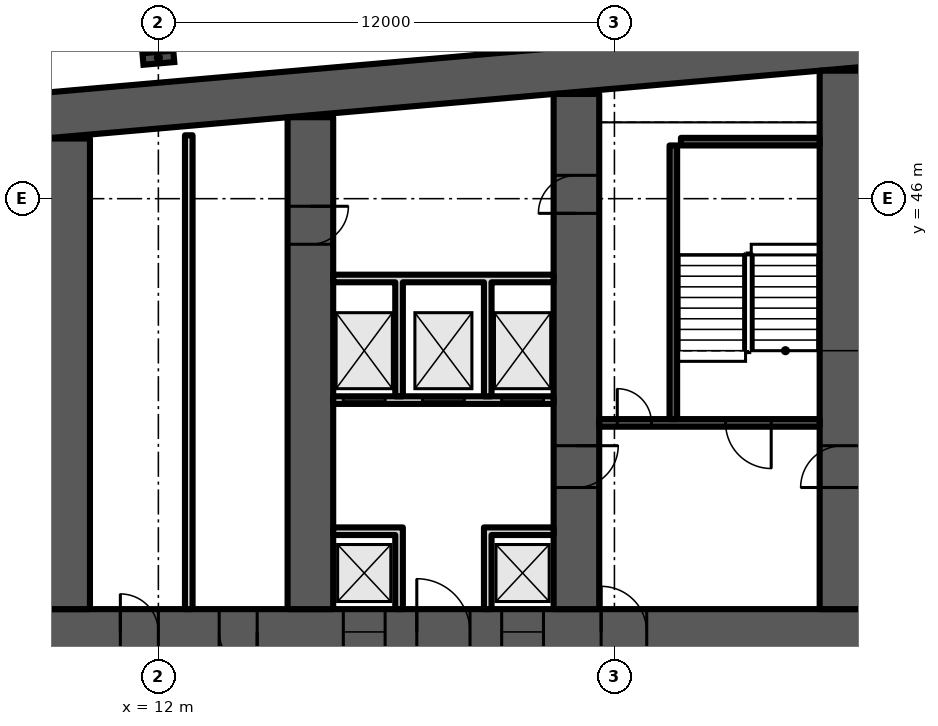
"""IFC4 building model, lengths in metres.
Left out: names, types, materials, properties, quantities, classifications, styles, units other than length and angle.
Written with IfcOpenShell. Run it as: python <this file> out.ifc"""

import sys

from ifc_helpers import new_model, si_unit, direction, frame, frame_2d, origin, origin_2d, place, context, subcontext, project, spatial, polyline, rectangle, i_section, outline, extrude, element, fill, save


model = new_model("IFC4")
c1 = context("Model", 3, precision=1e-05, world=origin(), true_north=direction((0.0, 1.0)))
c2 = subcontext(c1, "Body", "Model", "MODEL_VIEW")
j1 = project(units=[si_unit("LENGTHUNIT", "METRE"), si_unit("PLANEANGLEUNIT", "RADIAN")], contexts=[c1])
p1 = place(None, origin())
s1 = spatial("IfcSite", under=j1, at=p1, CompositionType="ELEMENT")
p2 = place(p1, origin())
s2 = spatial("IfcBuilding", under=s1, at=p2, CompositionType="ELEMENT")
p3 = place(p2, frame((0.0, 0.0, 73.9)))
s3 = spatial("IfcBuildingStorey", under=s2, at=p3, CompositionType="ELEMENT", Elevation=73.9)
p4 = place(p3, origin())
e1 = element("IfcWall", 1, at=p4, inside=s3, PredefinedType="SHEAR", context=c2, shape_type="SweptSolid", body=[
    extrude(outline(polyline([(9.0, 47.583), (37.0, 50.032), (65.0, 47.583), (65.0, 48.787), (37.0, 51.237), (9.0, 48.787), (9.0, 47.583)])), origin(), (0.0, 0.0, 1.0), 3.6),
])
p5 = place(p3, frame((9.0, 34.6, 0.0), z_axis=(0.0, 0.0, 1.0), x_axis=(1.0, 0.0, 0.0)))
e2 = element("IfcWall", 2, at=p5, inside=s3, PredefinedType="SHEAR", context=c2, shape_type="SweptSolid", body=[
    extrude(rectangle(XDim=56.0, YDim=1.2, at=frame_2d((28.0, 0.0))), origin(), (0.0, 0.0, 1.0), 3.6),
])
p6 = place(p5, frame((2.0, 0.0, 0.0)))
e3 = element("IfcOpeningElement", 3, at=p6, cuts=e2, PredefinedType="OPENING", context=c2, shape_type="SweptSolid", body=[
    extrude(rectangle(XDim=1.0, YDim=2.1, at=frame_2d((0.5, 1.05))), frame((0.0, 0.61, 0.0), z_axis=(0.0, -1.0, 0.0), x_axis=(1.0, 0.0, 0.0)), (0.0, 0.0, 1.0), 1.22),
])
p7 = place(p5, frame((4.6, 0.0, 0.0)))
e4 = element("IfcOpeningElement", 4, at=p7, cuts=e2, PredefinedType="OPENING", context=c2, shape_type="SweptSolid", body=[
    extrude(rectangle(XDim=1.0, YDim=2.1, at=frame_2d((0.5, 1.05))), frame((0.0, 0.61, 0.0), z_axis=(0.0, -1.0, 0.0), x_axis=(1.0, 0.0, 0.0)), (0.0, 0.0, 1.0), 1.22),
])
p8 = place(p5, frame((7.867, 0.0, 0.0)))
e5 = element("IfcOpeningElement", 5, at=p8, cuts=e2, PredefinedType="OPENING", context=c2, shape_type="SweptSolid", body=[
    extrude(rectangle(XDim=1.1, YDim=2.1, at=frame_2d((0.55, 1.05))), frame((0.0, 0.61, 0.0), z_axis=(0.0, -1.0, 0.0), x_axis=(1.0, 0.0, 0.0)), (0.0, 0.0, 1.0), 1.22),
])
p9 = place(p5, frame((12.033, 0.0, 0.0)))
e6 = element("IfcOpeningElement", 6, at=p9, cuts=e2, PredefinedType="OPENING", context=c2, shape_type="SweptSolid", body=[
    extrude(rectangle(XDim=1.1, YDim=2.1, at=frame_2d((0.55, 1.05))), frame((0.0, 0.61, 0.0), z_axis=(0.0, -1.0, 0.0), x_axis=(1.0, 0.0, 0.0)), (0.0, 0.0, 1.0), 1.22),
])
p10 = place(p5, frame((9.8, 0.0, 0.0)))
e7 = element("IfcOpeningElement", 7, at=p10, cuts=e2, PredefinedType="OPENING", context=c2, shape_type="SweptSolid", body=[
    extrude(rectangle(XDim=1.4, YDim=2.1, at=frame_2d((0.7, 1.05))), frame((0.0, 0.61, 0.0), z_axis=(0.0, -1.0, 0.0), x_axis=(1.0, 0.0, 0.0)), (0.0, 0.0, 1.0), 1.22),
])
p11 = place(p5, frame((14.65, 0.0, 0.0)))
e8 = element("IfcOpeningElement", 8, at=p11, cuts=e2, PredefinedType="OPENING", context=c2, shape_type="SweptSolid", body=[
    extrude(rectangle(XDim=1.2, YDim=2.1, at=frame_2d((0.6, 1.05))), frame((0.0, 0.61, 0.0), z_axis=(0.0, -1.0, 0.0), x_axis=(1.0, 0.0, 0.0)), (0.0, 0.0, 1.0), 1.22),
])
p12 = place(p5, frame((21.867, 0.0, 0.0)))
e9 = element("IfcOpeningElement", 9, at=p12, cuts=e2, PredefinedType="OPENING", context=c2, shape_type="SweptSolid", body=[
    extrude(rectangle(XDim=1.1, YDim=2.1, at=frame_2d((0.55, 1.05))), frame((0.0, 0.61, 0.0), z_axis=(0.0, -1.0, 0.0), x_axis=(1.0, 0.0, 0.0)), (0.0, 0.0, 1.0), 1.22),
])
p13 = place(p5, frame((26.033, 0.0, 0.0)))
e10 = element("IfcOpeningElement", 10, at=p13, cuts=e2, PredefinedType="OPENING", context=c2, shape_type="SweptSolid", body=[
    extrude(rectangle(XDim=1.1, YDim=2.1, at=frame_2d((0.55, 1.05))), frame((0.0, 0.61, 0.0), z_axis=(0.0, -1.0, 0.0), x_axis=(1.0, 0.0, 0.0)), (0.0, 0.0, 1.0), 1.22),
])
p14 = place(p5, frame((23.8, 0.0, 0.0)))
e11 = element("IfcOpeningElement", 11, at=p14, cuts=e2, PredefinedType="OPENING", context=c2, shape_type="SweptSolid", body=[
    extrude(rectangle(XDim=1.4, YDim=2.1, at=frame_2d((0.7, 1.05))), frame((0.0, 0.61, 0.0), z_axis=(0.0, -1.0, 0.0), x_axis=(1.0, 0.0, 0.0)), (0.0, 0.0, 1.0), 1.22),
])
p15 = place(p5, frame((28.867, 0.0, 0.0)))
e12 = element("IfcOpeningElement", 12, at=p15, cuts=e2, PredefinedType="OPENING", context=c2, shape_type="SweptSolid", body=[
    extrude(rectangle(XDim=1.1, YDim=2.1, at=frame_2d((0.55, 1.05))), frame((0.0, 0.61, 0.0), z_axis=(0.0, -1.0, 0.0), x_axis=(1.0, 0.0, 0.0)), (0.0, 0.0, 1.0), 1.22),
])
p16 = place(p5, frame((33.033, 0.0, 0.0)))
e13 = element("IfcOpeningElement", 13, at=p16, cuts=e2, PredefinedType="OPENING", context=c2, shape_type="SweptSolid", body=[
    extrude(rectangle(XDim=1.1, YDim=2.1, at=frame_2d((0.55, 1.05))), frame((0.0, 0.61, 0.0), z_axis=(0.0, -1.0, 0.0), x_axis=(1.0, 0.0, 0.0)), (0.0, 0.0, 1.0), 1.22),
])
p17 = place(p5, frame((40.15, 0.0, 0.0)))
e14 = element("IfcOpeningElement", 14, at=p17, cuts=e2, PredefinedType="OPENING", context=c2, shape_type="SweptSolid", body=[
    extrude(rectangle(XDim=1.2, YDim=2.1, at=frame_2d((0.6, 1.05))), frame((0.0, 0.61, 0.0), z_axis=(0.0, -1.0, 0.0), x_axis=(1.0, 0.0, 0.0)), (0.0, 0.0, 1.0), 1.22),
])
p18 = place(p5, frame((44.8, 0.0, 0.0)))
e15 = element("IfcOpeningElement", 15, at=p18, cuts=e2, PredefinedType="OPENING", context=c2, shape_type="SweptSolid", body=[
    extrude(rectangle(XDim=1.4, YDim=2.1, at=frame_2d((0.7, 1.05))), frame((0.0, 0.61, 0.0), z_axis=(0.0, -1.0, 0.0), x_axis=(1.0, 0.0, 0.0)), (0.0, 0.0, 1.0), 1.22),
])
p19 = place(p5, frame((49.867, 0.0, 0.0)))
e16 = element("IfcOpeningElement", 16, at=p19, cuts=e2, PredefinedType="OPENING", context=c2, shape_type="SweptSolid", body=[
    extrude(rectangle(XDim=1.1, YDim=2.1, at=frame_2d((0.55, 1.05))), frame((0.0, 0.61, 0.0), z_axis=(0.0, -1.0, 0.0), x_axis=(1.0, 0.0, 0.0)), (0.0, 0.0, 1.0), 1.22),
])
p20 = place(p5, frame((53.5, 0.0, 0.0)))
e17 = element("IfcOpeningElement", 17, at=p20, cuts=e2, PredefinedType="OPENING", context=c2, shape_type="SweptSolid", body=[
    extrude(rectangle(XDim=1.1, YDim=2.1, at=frame_2d((0.55, 1.05))), frame((0.0, 0.61, 0.0), z_axis=(0.0, -1.0, 0.0), x_axis=(1.0, 0.0, 0.0)), (0.0, 0.0, 1.0), 1.22),
])
p21 = place(p5, frame((51.567, 0.0, 0.0)))
e18 = element("IfcOpeningElement", 18, at=p21, cuts=e2, PredefinedType="OPENING", context=c2, shape_type="SweptSolid", body=[
    extrude(rectangle(XDim=1.4, YDim=2.1, at=frame_2d((0.7, 1.05))), frame((0.0, 0.61, 0.0), z_axis=(0.0, -1.0, 0.0), x_axis=(1.0, 0.0, 0.0)), (0.0, 0.0, 1.0), 1.22),
])
p22 = place(p3, frame((9.6, 35.2, 0.0), z_axis=(0.0, 0.0, 1.0), x_axis=(0.0, 1.0, 0.0)))
e19 = element("IfcWall", 19, at=p22, inside=s3, PredefinedType="SHEAR", context=c2, shape_type="SweptSolid", body=[
    extrude(rectangle(XDim=12.383, YDim=1.2, at=frame_2d((6.191, 0.0))), origin(), (0.0, 0.0, 1.0), 3.6),
])
p23 = place(p3, frame((16.0, 35.2, 0.0), z_axis=(0.0, 0.0, 1.0), x_axis=(0.0, 1.0, 0.0)))
e20 = element("IfcWall", 20, at=p23, inside=s3, PredefinedType="SHEAR", context=c2, shape_type="SweptSolid", body=[
    extrude(rectangle(XDim=12.943, YDim=1.2, at=frame_2d((6.471, 0.0))), origin(), (0.0, 0.0, 1.0), 3.6),
])
p24 = place(p23, frame((9.6, 0.0, 0.0)))
e21 = element("IfcOpeningElement", 21, at=p24, cuts=e20, PredefinedType="OPENING", context=c2, shape_type="SweptSolid", body=[
    extrude(rectangle(XDim=1.0, YDim=2.1, at=frame_2d((0.5, 1.05))), frame((0.0, 0.61, 0.0), z_axis=(0.0, -1.0, 0.0), x_axis=(1.0, 0.0, 0.0)), (0.0, 0.0, 1.0), 1.22),
])
p25 = place(p3, frame((23.0, 35.2, 0.0), z_axis=(0.0, 0.0, 1.0), x_axis=(0.0, 1.0, 0.0)))
e22 = element("IfcWall", 22, at=p25, inside=s3, PredefinedType="SHEAR", context=c2, shape_type="SweptSolid", body=[
    extrude(rectangle(XDim=13.555, YDim=1.2, at=frame_2d((6.778, 0.0))), origin(), (0.0, 0.0, 1.0), 3.6),
])
p26 = place(p25, frame((10.414, 0.0, 0.0)))
e23 = element("IfcOpeningElement", 23, at=p26, cuts=e22, PredefinedType="OPENING", context=c2, shape_type="SweptSolid", body=[
    extrude(rectangle(XDim=1.0, YDim=2.1, at=frame_2d((0.5, 1.05))), frame((0.0, 0.61, 0.0), z_axis=(0.0, -1.0, 0.0), x_axis=(1.0, 0.0, 0.0)), (0.0, 0.0, 1.0), 1.22),
])
p27 = place(p25, frame((3.2, 0.0, 0.0)))
e24 = element("IfcOpeningElement", 24, at=p27, cuts=e22, PredefinedType="OPENING", context=c2, shape_type="SweptSolid", body=[
    extrude(rectangle(XDim=1.1, YDim=2.1, at=frame_2d((0.55, 1.05))), frame((0.0, 0.61, 0.0), z_axis=(0.0, -1.0, 0.0), x_axis=(1.0, 0.0, 0.0)), (0.0, 0.0, 1.0), 1.22),
])
p28 = place(p3, frame((30.0, 35.2, 0.0), z_axis=(0.0, 0.0, 1.0), x_axis=(0.0, 1.0, 0.0)))
e25 = element("IfcWall", 25, at=p28, inside=s3, PredefinedType="SHEAR", context=c2, shape_type="SweptSolid", body=[
    extrude(rectangle(XDim=14.168, YDim=1.2, at=frame_2d((7.084, 0.0))), origin(), (0.0, 0.0, 1.0), 3.6),
])
p29 = place(p28, frame((3.2, 0.0, 0.0)))
e26 = element("IfcOpeningElement", 26, at=p29, cuts=e25, PredefinedType="OPENING", context=c2, shape_type="SweptSolid", body=[
    extrude(rectangle(XDim=1.1, YDim=2.1, at=frame_2d((0.55, 1.05))), frame((0.0, 0.61, 0.0), z_axis=(0.0, -1.0, 0.0), x_axis=(1.0, 0.0, 0.0)), (0.0, 0.0, 1.0), 1.22),
])
p30 = place(p3, frame((12.0, 49.71, 0.0), z_axis=(0.0, 0.0, 1.0), x_axis=(-0.087156, 0.996197, 0.0)))
e27 = element("IfcColumn", 27, at=p30, inside=s3, PredefinedType="COLUMN", context=c2, shape_type="SweptSolid", body=[
    extrude(i_section(OverallWidth=0.303, OverallDepth=0.814, WebThickness=0.021, FlangeThickness=0.04, FilletRadius=0.03, at=origin_2d()), origin(), (0.0, 0.0, 1.0), 3.6),
])
p31 = place(p3, frame((12.8, 35.2, 0.0), z_axis=(0.0, 0.0, 1.0), x_axis=(0.0, 1.0, 0.0)))
e28 = element("IfcWall", 28, at=p31, inside=s3, PredefinedType="PARTITIONING", context=c2, shape_type="SweptSolid", body=[
    extrude(rectangle(XDim=12.468, YDim=0.2, at=frame_2d((6.234, 0.0))), origin(), (0.0, 0.0, 1.0), 3.2),
])
p32 = place(p3, frame((16.6, 40.7, 0.0), z_axis=(0.0, 0.0, 1.0), x_axis=(1.0, 0.0, 0.0)))
e29 = element("IfcWall", 29, at=p32, inside=s3, PredefinedType="PARTITIONING", context=c2, shape_type="SweptSolid", body=[
    extrude(rectangle(XDim=5.8, YDim=0.2, at=frame_2d((2.9, 0.0))), origin(), (0.0, 0.0, 1.0), 3.2),
])
p33 = place(p32, frame((0.267, 0.0, 0.0)))
e30 = element("IfcOpeningElement", 30, at=p33, cuts=e29, PredefinedType="OPENING", context=c2, shape_type="SweptSolid", body=[
    extrude(rectangle(XDim=1.1, YDim=2.1, at=frame_2d((0.55, 1.05))), frame((0.0, 0.11, 0.0), z_axis=(0.0, -1.0, 0.0), x_axis=(1.0, 0.0, 0.0)), (0.0, 0.0, 1.0), 0.22),
])
p34 = place(p32, frame((2.35, 0.0, 0.0)))
e31 = element("IfcOpeningElement", 31, at=p34, cuts=e29, PredefinedType="OPENING", context=c2, shape_type="SweptSolid", body=[
    extrude(rectangle(XDim=1.1, YDim=2.1, at=frame_2d((0.55, 1.05))), frame((0.0, 0.11, 0.0), z_axis=(0.0, -1.0, 0.0), x_axis=(1.0, 0.0, 0.0)), (0.0, 0.0, 1.0), 0.22),
])
p35 = place(p32, frame((4.433, 0.0, 0.0)))
e32 = element("IfcOpeningElement", 32, at=p35, cuts=e29, PredefinedType="OPENING", context=c2, shape_type="SweptSolid", body=[
    extrude(rectangle(XDim=1.1, YDim=2.1, at=frame_2d((0.55, 1.05))), frame((0.0, 0.11, 0.0), z_axis=(0.0, -1.0, 0.0), x_axis=(1.0, 0.0, 0.0)), (0.0, 0.0, 1.0), 0.22),
])
p36 = place(p3, origin())
e33 = element("IfcWall", 33, at=p36, inside=s3, PredefinedType="PARTITIONING", context=c2, shape_type="SweptSolid", body=[
    extrude(outline(polyline([(18.233, 37.15), (16.6, 37.15), (16.6, 37.35), (18.233, 37.35), (18.433, 37.35), (18.433, 35.2), (18.233, 35.2), (18.233, 37.15)])), origin(), (0.0, 0.0, 1.0), 3.2),
])
p37 = place(p3, origin())
e34 = element("IfcWall", 34, at=p37, inside=s3, PredefinedType="PARTITIONING", context=c2, shape_type="SweptSolid", body=[
    extrude(outline(polyline([(20.567, 37.35), (20.767, 37.35), (22.4, 37.35), (22.4, 37.15), (20.767, 37.15), (20.767, 35.2), (20.567, 35.2), (20.567, 37.35)])), origin(), (0.0, 0.0, 1.0), 3.2),
])
p38 = place(p3, origin())
e35 = element("IfcWall", 35, at=p38, inside=s3, PredefinedType="PARTITIONING", context=c2, shape_type="SweptSolid", body=[
    extrude(outline(polyline([(18.433, 40.8), (18.233, 40.8), (18.233, 43.8), (16.6, 43.8), (16.6, 44.0), (22.4, 44.0), (22.4, 43.8), (20.767, 43.8), (20.767, 40.8), (20.567, 40.8), (20.567, 43.8), (18.433, 43.8), (18.433, 40.8)])), origin(), (0.0, 0.0, 1.0), 3.2),
])
p39 = place(p3, frame((23.6, 40.1, 0.0), z_axis=(0.0, 0.0, 1.0), x_axis=(1.0, 0.0, 0.0)))
e36 = element("IfcWall", 36, at=p39, inside=s3, PredefinedType="SHEAR", context=c2, shape_type="SweptSolid", body=[
    extrude(rectangle(XDim=5.8, YDim=0.2, at=frame_2d((2.9, 0.0))), origin(), (0.0, 0.0, 1.0), 3.2),
])
p40 = place(p39, frame((3.325, 0.0, 0.0)))
e37 = element("IfcOpeningElement", 37, at=p40, cuts=e36, PredefinedType="OPENING", context=c2, shape_type="SweptSolid", body=[
    extrude(rectangle(XDim=1.2, YDim=2.1, at=frame_2d((0.6, 1.05))), frame((0.0, 0.11, 0.0), z_axis=(0.0, -1.0, 0.0), x_axis=(1.0, 0.0, 0.0)), (0.0, 0.0, 1.0), 0.22),
])
p41 = place(p39, frame((0.475, 0.0, 0.0)))
e38 = element("IfcOpeningElement", 38, at=p41, cuts=e36, PredefinedType="OPENING", context=c2, shape_type="SweptSolid", body=[
    extrude(rectangle(XDim=0.9, YDim=2.1, at=frame_2d((0.45, 1.05))), frame((0.0, 0.11, 0.0), z_axis=(0.0, -1.0, 0.0), x_axis=(1.0, 0.0, 0.0)), (0.0, 0.0, 1.0), 0.22),
])
p42 = place(p3, frame((25.55, 40.2, 0.0), z_axis=(0.0, 0.0, 1.0), x_axis=(0.0, 1.0, 0.0)))
e39 = element("IfcWall", 39, at=p42, inside=s3, PredefinedType="SHEAR", context=c2, shape_type="SweptSolid", body=[
    extrude(rectangle(XDim=7.2, YDim=0.2, at=frame_2d((3.6, 0.0))), origin(), (0.0, 0.0, 1.0), 3.2),
])
p43 = place(p3, frame((25.75, 47.5, 0.0), z_axis=(0.0, 0.0, 1.0), x_axis=(1.0, 0.0, 0.0)))
e40 = element("IfcWall", 40, at=p43, inside=s3, PredefinedType="SHEAR", context=c2, shape_type="SweptSolid", body=[
    extrude(rectangle(XDim=3.65, YDim=0.2, at=frame_2d((1.825, 0.0))), origin(), (0.0, 0.0, 1.0), 3.2),
])
p44 = place(p6, origin())
e41 = element("IfcDoor", 41, at=p44, inside=s3, OperationType="SINGLE_SWING_LEFT", PredefinedType="DOOR", context=c2, shape_type="SweptSolid", body=[
    extrude(rectangle(XDim=1.0, YDim=2.1, at=frame_2d((0.5, 1.05))), frame((0.0, 0.6, 0.0), z_axis=(0.0, -1.0, 0.0), x_axis=(1.0, 0.0, 0.0)), (0.0, 0.0, 1.0), 1.199),
])
fill(e3, e41)
p45 = place(p7, origin())
e42 = element("IfcDoor", 42, at=p45, inside=s3, OperationType="SINGLE_SWING_RIGHT", PredefinedType="DOOR", context=c2, shape_type="SweptSolid", body=[
    extrude(rectangle(XDim=1.0, YDim=2.1, at=frame_2d((0.5, 1.05))), frame((0.0, 0.6, 0.0), z_axis=(0.0, -1.0, 0.0), x_axis=(1.0, 0.0, 0.0)), (0.0, 0.0, 1.0), 1.199),
])
fill(e4, e42)
p46 = place(p8, origin())
e43 = element("IfcDoor", 43, at=p46, inside=s3, OperationType="DOUBLE_DOOR_SLIDING", PredefinedType="DOOR", context=c2, shape_type="SweptSolid", body=[
    extrude(rectangle(XDim=1.1, YDim=2.1, at=frame_2d((0.55, 1.05))), frame((0.0, 0.025, 0.0), z_axis=(0.0, -1.0, 0.0), x_axis=(1.0, 0.0, 0.0)), (0.0, 0.0, 1.0), 0.05),
])
fill(e5, e43)
p47 = place(p9, origin())
e44 = element("IfcDoor", 44, at=p47, inside=s3, OperationType="DOUBLE_DOOR_SLIDING", PredefinedType="DOOR", context=c2, shape_type="SweptSolid", body=[
    extrude(rectangle(XDim=1.1, YDim=2.1, at=frame_2d((0.55, 1.05))), frame((0.0, 0.025, 0.0), z_axis=(0.0, -1.0, 0.0), x_axis=(1.0, 0.0, 0.0)), (0.0, 0.0, 1.0), 0.05),
])
fill(e6, e44)
p48 = place(p10, origin())
e45 = element("IfcDoor", 45, at=p48, inside=s3, OperationType="DOUBLE_DOOR_SINGLE_SWING", PredefinedType="DOOR", context=c2, shape_type="SweptSolid", body=[
    extrude(rectangle(XDim=1.4, YDim=2.1, at=frame_2d((0.7, 1.05))), frame((0.0, 0.025, 0.0), z_axis=(0.0, -1.0, 0.0), x_axis=(1.0, 0.0, 0.0)), (0.0, 0.0, 1.0), 0.05),
])
fill(e7, e45)
p49 = place(p33, origin())
e46 = element("IfcDoor", 46, at=p49, inside=s3, OperationType="DOUBLE_DOOR_SLIDING", PredefinedType="DOOR", context=c2, shape_type="SweptSolid", body=[
    extrude(rectangle(XDim=1.1, YDim=2.1, at=frame_2d((0.55, 1.05))), frame((0.0, 0.025, 0.0), z_axis=(0.0, -1.0, 0.0), x_axis=(1.0, 0.0, 0.0)), (0.0, 0.0, 1.0), 0.05),
])
fill(e30, e46)
p50 = place(p34, origin())
e47 = element("IfcDoor", 47, at=p50, inside=s3, OperationType="DOUBLE_DOOR_SLIDING", PredefinedType="DOOR", context=c2, shape_type="SweptSolid", body=[
    extrude(rectangle(XDim=1.1, YDim=2.1, at=frame_2d((0.55, 1.05))), frame((0.0, 0.025, 0.0), z_axis=(0.0, -1.0, 0.0), x_axis=(1.0, 0.0, 0.0)), (0.0, 0.0, 1.0), 0.05),
])
fill(e31, e47)
p51 = place(p35, origin())
e48 = element("IfcDoor", 48, at=p51, inside=s3, OperationType="DOUBLE_DOOR_SLIDING", PredefinedType="DOOR", context=c2, shape_type="SweptSolid", body=[
    extrude(rectangle(XDim=1.1, YDim=2.1, at=frame_2d((0.55, 1.05))), frame((0.0, 0.025, 0.0), z_axis=(0.0, -1.0, 0.0), x_axis=(1.0, 0.0, 0.0)), (0.0, 0.0, 1.0), 0.05),
])
fill(e32, e48)
p52 = place(p26, origin())
e49 = element("IfcDoor", 49, at=p52, inside=s3, OperationType="SINGLE_SWING_LEFT", PredefinedType="DOOR", context=c2, shape_type="SweptSolid", body=[
    extrude(rectangle(XDim=1.0, YDim=2.1, at=frame_2d((0.5, 1.05))), frame((0.0, 0.6, 0.0), z_axis=(0.0, -1.0, 0.0), x_axis=(1.0, 0.0, 0.0)), (0.0, 0.0, 1.0), 1.199),
])
fill(e23, e49)
p53 = place(p40, origin())
e50 = element("IfcDoor", 50, at=p53, inside=s3, OperationType="SINGLE_SWING_RIGHT", PredefinedType="DOOR", context=c2, shape_type="SweptSolid", body=[
    extrude(rectangle(XDim=1.2, YDim=2.1, at=frame_2d((0.6, 1.05))), frame((0.0, 0.025, 0.0), z_axis=(0.0, -1.0, 0.0), x_axis=(1.0, 0.0, 0.0)), (0.0, 0.0, 1.0), 0.05),
])
fill(e37, e50)
p54 = place(p41, origin())
e51 = element("IfcDoor", 51, at=p54, inside=s3, OperationType="SINGLE_SWING_LEFT", PredefinedType="DOOR", context=c2, shape_type="SweptSolid", body=[
    extrude(rectangle(XDim=0.9, YDim=2.1, at=frame_2d((0.45, 1.05))), frame((0.0, 0.025, 0.0), z_axis=(0.0, -1.0, 0.0), x_axis=(1.0, 0.0, 0.0)), (0.0, 0.0, 1.0), 0.05),
])
fill(e38, e51)
p55 = place(p11, origin())
e52 = element("IfcDoor", 52, at=p55, inside=s3, OperationType="SINGLE_SWING_LEFT", PredefinedType="DOOR", context=c2, shape_type="SweptSolid", body=[
    extrude(rectangle(XDim=1.2, YDim=2.1, at=frame_2d((0.6, 1.05))), frame((0.0, 0.025, 0.0), z_axis=(0.0, -1.0, 0.0), x_axis=(1.0, 0.0, 0.0)), (0.0, 0.0, 1.0), 0.05),
])
fill(e8, e52)
p56 = place(p24, origin())
e53 = element("IfcDoor", 53, at=p56, inside=s3, OperationType="SINGLE_SWING_RIGHT", PredefinedType="DOOR", context=c2, shape_type="SweptSolid", body=[
    extrude(rectangle(XDim=1.0, YDim=2.1, at=frame_2d((0.5, 1.05))), frame((0.0, 0.6, 0.0), z_axis=(0.0, -1.0, 0.0), x_axis=(1.0, 0.0, 0.0)), (0.0, 0.0, 1.0), 1.199),
])
fill(e21, e53)
p57 = place(p27, origin())
e54 = element("IfcDoor", 54, at=p57, inside=s3, OperationType="SINGLE_SWING_RIGHT", PredefinedType="DOOR", context=c2, shape_type="SweptSolid", body=[
    extrude(rectangle(XDim=1.1, YDim=2.1, at=frame_2d((0.55, 1.05))), frame((0.0, 0.025, 0.0), z_axis=(0.0, -1.0, 0.0), x_axis=(1.0, 0.0, 0.0)), (0.0, 0.0, 1.0), 0.05),
])
fill(e24, e54)
p58 = place(p29, origin())
e55 = element("IfcDoor", 55, at=p58, inside=s3, OperationType="SINGLE_SWING_LEFT", PredefinedType="DOOR", context=c2, shape_type="SweptSolid", body=[
    extrude(rectangle(XDim=1.1, YDim=2.1, at=frame_2d((0.55, 1.05))), frame((0.0, 0.025, 0.0), z_axis=(0.0, -1.0, 0.0), x_axis=(1.0, 0.0, 0.0)), (0.0, 0.0, 1.0), 0.05),
])
fill(e26, e55)
save(model, sys.argv[1])
